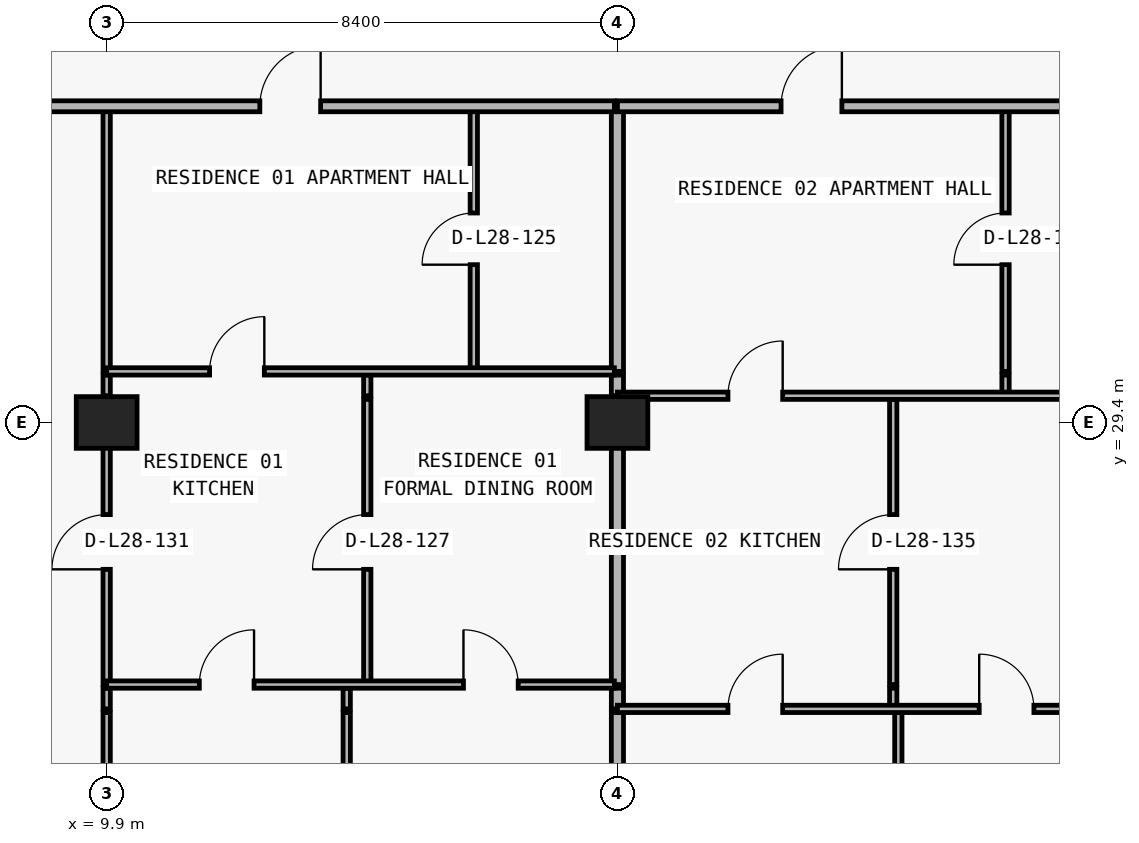
"""IFC4 building model, lengths in metres.
Left out: names, types, materials, properties, quantities, classifications, styles, units other than length and angle.
Written with IfcOpenShell. Run it as: python <this file> out.ifc"""

import sys

from ifc_helpers import new_model, si_unit, direction, frame, frame_2d, origin, origin_2d, place, context, subcontext, project, spatial, rectangle, extrude, element, fill, save


model = new_model("IFC4")
c1 = context("Model", 3, precision=1e-05, world=origin(), true_north=direction((0.0, 1.0)))
c2 = subcontext(c1, "Body", "Model", "MODEL_VIEW")
j1 = project(units=[si_unit("LENGTHUNIT", "METRE"), si_unit("PLANEANGLEUNIT", "RADIAN")], contexts=[c1])
p1 = place(None, origin())
s1 = spatial("IfcSite", under=j1, at=p1, CompositionType="ELEMENT")
p2 = place(p1, origin())
s2 = spatial("IfcBuilding", under=s1, at=p2, CompositionType="ELEMENT")
p3 = place(p2, frame((0.0, 0.0, 105.9)))
s3 = spatial("IfcBuildingStorey", under=s2, at=p3, CompositionType="ELEMENT", Elevation=105.9)
for number, where, z_axis, x_axis in (
    (1, (9.9, 29.4, 0.0), (0.0, 0.0, 1.0), (1.0, 0.0, 0.0)),
    (2, (18.3, 29.4, 0.0), (0.0, 0.0, 1.0), (1.0, 0.0, 0.0)),
):
    element("IfcColumn", number, at=place(p3, frame(where, z_axis=z_axis, x_axis=x_axis)), inside=s3, PredefinedType="COLUMN", context=c2, shape_type="SweptSolid", body=[
        extrude(rectangle(XDim=1.0, YDim=0.85, at=origin_2d()), origin(), (0.0, 0.0, 1.0), 3.05),
    ])
p4 = place(p3, frame((9.9, 8.84, 0.0), z_axis=(0.0, 0.0, 1.0), x_axis=(0.0, 1.0, 0.0)))
e3 = element("IfcWall", 3, at=p4, inside=s3, PredefinedType="PARTITIONING", context=c2, shape_type="SweptSolid", body=[
    extrude(rectangle(XDim=15.79, YDim=0.12, at=frame_2d((7.895, 0.0))), origin(), (0.0, 0.0, 1.0), 2.174),
])
p5 = place(p3, frame((9.9, 24.69, 0.0), z_axis=(0.0, 0.0, 1.0), x_axis=(0.0, 1.0, 0.0)))
e4 = element("IfcWall", 4, at=p5, inside=s3, PredefinedType="PARTITIONING", context=c2, shape_type="SweptSolid", body=[
    extrude(rectangle(XDim=0.34, YDim=0.12, at=frame_2d((0.17, 0.0))), origin(), (0.0, 0.0, 1.0), 2.174),
])
p6 = place(p3, frame((9.9, 25.09, 0.0), z_axis=(0.0, 0.0, 1.0), x_axis=(0.0, 1.0, 0.0)))
e5 = element("IfcWall", 5, at=p6, inside=s3, PredefinedType="PARTITIONING", context=c2, shape_type="SweptSolid", body=[
    extrude(rectangle(XDim=4.69, YDim=0.12, at=frame_2d((2.345, 0.0))), origin(), (0.0, 0.0, 1.0), 2.174),
])
p7 = place(p6, frame((1.895, 0.0, 0.0)))
e6 = element("IfcOpeningElement", 6, at=p7, cuts=e5, PredefinedType="OPENING", context=c2, shape_type="SweptSolid", body=[
    extrude(rectangle(XDim=0.9, YDim=2.124, at=frame_2d((0.45, 1.062))), frame((0.0, 0.07, 0.0), z_axis=(0.0, -1.0, 0.0), x_axis=(1.0, 0.0, 0.0)), (0.0, 0.0, 1.0), 0.14),
])
p8 = place(p3, frame((9.9, 29.84, 0.0), z_axis=(0.0, 0.0, 1.0), x_axis=(0.0, 1.0, 0.0)))
e7 = element("IfcWall", 7, at=p8, inside=s3, PredefinedType="PARTITIONING", context=c2, shape_type="SweptSolid", body=[
    extrude(rectangle(XDim=0.34, YDim=0.12, at=frame_2d((0.17, 0.0))), origin(), (0.0, 0.0, 1.0), 2.174),
])
p9 = place(p3, frame((9.9, 30.24, 0.0), z_axis=(0.0, 0.0, 1.0), x_axis=(0.0, 1.0, 0.0)))
e8 = element("IfcWall", 8, at=p9, inside=s3, PredefinedType="PARTITIONING", context=c2, shape_type="SweptSolid", body=[
    extrude(rectangle(XDim=4.36, YDim=0.12, at=frame_2d((2.18, 0.0))), origin(), (0.0, 0.0, 1.0), 2.174),
])
p10 = place(p3, frame((13.848, 8.84, 0.0), z_axis=(0.0, 0.0, 1.0), x_axis=(0.0, 1.0, 0.0)))
e9 = element("IfcWall", 9, at=p10, inside=s3, PredefinedType="PARTITIONING", context=c2, shape_type="SweptSolid", body=[
    extrude(rectangle(XDim=15.79, YDim=0.12, at=frame_2d((7.895, 0.0))), origin(), (0.0, 0.0, 1.0), 3.05),
])
p11 = place(p3, frame((13.848, 24.69, 0.0), z_axis=(0.0, 0.0, 1.0), x_axis=(0.0, 1.0, 0.0)))
e10 = element("IfcWall", 10, at=p11, inside=s3, PredefinedType="PARTITIONING", context=c2, shape_type="SweptSolid", body=[
    extrude(rectangle(XDim=0.34, YDim=0.12, at=frame_2d((0.17, 0.0))), origin(), (0.0, 0.0, 1.0), 3.05),
])
p12 = place(p3, frame((14.186, 25.09, 0.0), z_axis=(0.0, 0.0, 1.0), x_axis=(0.0, 1.0, 0.0)))
e11 = element("IfcWall", 11, at=p12, inside=s3, PredefinedType="PARTITIONING", context=c2, shape_type="SweptSolid", body=[
    extrude(rectangle(XDim=4.69, YDim=0.12, at=frame_2d((2.345, 0.0))), origin(), (0.0, 0.0, 1.0), 3.05),
])
p13 = place(p12, frame((1.895, 0.0, 0.0)))
e12 = element("IfcOpeningElement", 12, at=p13, cuts=e11, PredefinedType="OPENING", context=c2, shape_type="SweptSolid", body=[
    extrude(rectangle(XDim=0.9, YDim=2.15, at=frame_2d((0.45, 1.075))), frame((0.0, 0.07, 0.0), z_axis=(0.0, -1.0, 0.0), x_axis=(1.0, 0.0, 0.0)), (0.0, 0.0, 1.0), 0.14),
])
p14 = place(p3, frame((14.186, 29.84, 0.0), z_axis=(0.0, 0.0, 1.0), x_axis=(0.0, 1.0, 0.0)))
e13 = element("IfcWall", 13, at=p14, inside=s3, PredefinedType="PARTITIONING", context=c2, shape_type="SweptSolid", body=[
    extrude(rectangle(XDim=0.34, YDim=0.12, at=frame_2d((0.17, 0.0))), origin(), (0.0, 0.0, 1.0), 3.05),
])
p15 = place(p3, frame((15.938, 30.24, 0.0), z_axis=(0.0, 0.0, 1.0), x_axis=(0.0, 1.0, 0.0)))
e14 = element("IfcWall", 14, at=p15, inside=s3, PredefinedType="PARTITIONING", context=c2, shape_type="SweptSolid", body=[
    extrude(rectangle(XDim=4.36, YDim=0.12, at=frame_2d((2.18, 0.0))), origin(), (0.0, 0.0, 1.0), 3.05),
])
p16 = place(p15, frame((1.755, 0.0, 0.0)))
e15 = element("IfcOpeningElement", 15, at=p16, cuts=e14, PredefinedType="OPENING", context=c2, shape_type="SweptSolid", body=[
    extrude(rectangle(XDim=0.85, YDim=2.1, at=frame_2d((0.425, 1.05))), frame((0.0, 0.07, 0.0), z_axis=(0.0, -1.0, 0.0), x_axis=(1.0, 0.0, 0.0)), (0.0, 0.0, 1.0), 0.14),
])
p17 = place(p3, frame((18.3, 8.84, 0.0), z_axis=(0.0, 0.0, 1.0), x_axis=(0.0, 1.0, 0.0)))
e16 = element("IfcWall", 16, at=p17, inside=s3, PredefinedType="PARTITIONING", context=c2, shape_type="SweptSolid", body=[
    extrude(rectangle(XDim=15.79, YDim=0.2, at=frame_2d((7.895, 0.0))), origin(), (0.0, 0.0, 1.0), 2.174),
])
p18 = place(p3, frame((18.3, 24.69, 0.0), z_axis=(0.0, 0.0, 1.0), x_axis=(0.0, 1.0, 0.0)))
e17 = element("IfcWall", 17, at=p18, inside=s3, PredefinedType="PARTITIONING", context=c2, shape_type="SweptSolid", body=[
    extrude(rectangle(XDim=0.34, YDim=0.2, at=frame_2d((0.17, 0.0))), origin(), (0.0, 0.0, 1.0), 2.174),
])
p19 = place(p3, frame((18.3, 25.09, 0.0), z_axis=(0.0, 0.0, 1.0), x_axis=(0.0, 1.0, 0.0)))
e18 = element("IfcWall", 18, at=p19, inside=s3, PredefinedType="PARTITIONING", context=c2, shape_type="SweptSolid", body=[
    extrude(rectangle(XDim=4.69, YDim=0.2, at=frame_2d((2.345, 0.0))), origin(), (0.0, 0.0, 1.0), 2.174),
])
p20 = place(p3, frame((18.3, 29.84, 0.0), z_axis=(0.0, 0.0, 1.0), x_axis=(0.0, 1.0, 0.0)))
e19 = element("IfcWall", 19, at=p20, inside=s3, PredefinedType="PARTITIONING", context=c2, shape_type="SweptSolid", body=[
    extrude(rectangle(XDim=0.34, YDim=0.2, at=frame_2d((0.17, 0.0))), origin(), (0.0, 0.0, 1.0), 2.174),
])
p21 = place(p3, frame((18.3, 30.24, 0.0), z_axis=(0.0, 0.0, 1.0), x_axis=(0.0, 1.0, 0.0)))
e20 = element("IfcWall", 20, at=p21, inside=s3, PredefinedType="PARTITIONING", context=c2, shape_type="SweptSolid", body=[
    extrude(rectangle(XDim=4.36, YDim=0.2, at=frame_2d((2.18, 0.0))), origin(), (0.0, 0.0, 1.0), 2.174),
])
p22 = place(p3, frame((22.836, 24.69, 0.0), z_axis=(0.0, 0.0, 1.0), x_axis=(0.0, 1.0, 0.0)))
e21 = element("IfcWall", 21, at=p22, inside=s3, PredefinedType="PARTITIONING", context=c2, shape_type="SweptSolid", body=[
    extrude(rectangle(XDim=0.34, YDim=0.12, at=frame_2d((0.17, 0.0))), origin(), (0.0, 0.0, 1.0), 3.05),
])
p23 = place(p3, frame((22.836, 25.09, 0.0), z_axis=(0.0, 0.0, 1.0), x_axis=(0.0, 1.0, 0.0)))
e22 = element("IfcWall", 22, at=p23, inside=s3, PredefinedType="PARTITIONING", context=c2, shape_type="SweptSolid", body=[
    extrude(rectangle(XDim=4.69, YDim=0.12, at=frame_2d((2.345, 0.0))), origin(), (0.0, 0.0, 1.0), 3.05),
])
p24 = place(p23, frame((1.895, 0.0, 0.0)))
e23 = element("IfcOpeningElement", 23, at=p24, cuts=e22, PredefinedType="OPENING", context=c2, shape_type="SweptSolid", body=[
    extrude(rectangle(XDim=0.9, YDim=2.15, at=frame_2d((0.45, 1.075))), frame((0.0, 0.07, 0.0), z_axis=(0.0, -1.0, 0.0), x_axis=(1.0, 0.0, 0.0)), (0.0, 0.0, 1.0), 0.14),
])
p25 = place(p3, frame((22.92, 8.84, 0.0), z_axis=(0.0, 0.0, 1.0), x_axis=(0.0, 1.0, 0.0)))
e24 = element("IfcWall", 24, at=p25, inside=s3, PredefinedType="PARTITIONING", context=c2, shape_type="SweptSolid", body=[
    extrude(rectangle(XDim=15.79, YDim=0.12, at=frame_2d((7.895, 0.0))), origin(), (0.0, 0.0, 1.0), 3.05),
])
p26 = place(p3, frame((24.683, 29.84, 0.0), z_axis=(0.0, 0.0, 1.0), x_axis=(0.0, 1.0, 0.0)))
e25 = element("IfcWall", 25, at=p26, inside=s3, PredefinedType="PARTITIONING", context=c2, shape_type="SweptSolid", body=[
    extrude(rectangle(XDim=0.34, YDim=0.12, at=frame_2d((0.17, 0.0))), origin(), (0.0, 0.0, 1.0), 3.05),
])
p27 = place(p3, frame((24.683, 30.24, 0.0), z_axis=(0.0, 0.0, 1.0), x_axis=(0.0, 1.0, 0.0)))
e26 = element("IfcWall", 26, at=p27, inside=s3, PredefinedType="PARTITIONING", context=c2, shape_type="SweptSolid", body=[
    extrude(rectangle(XDim=4.36, YDim=0.12, at=frame_2d((2.18, 0.0))), origin(), (0.0, 0.0, 1.0), 3.05),
])
p28 = place(p27, frame((1.755, 0.0, 0.0)))
e27 = element("IfcOpeningElement", 27, at=p28, cuts=e26, PredefinedType="OPENING", context=c2, shape_type="SweptSolid", body=[
    extrude(rectangle(XDim=0.85, YDim=2.1, at=frame_2d((0.425, 1.05))), frame((0.0, 0.07, 0.0), z_axis=(0.0, -1.0, 0.0), x_axis=(1.0, 0.0, 0.0)), (0.0, 0.0, 1.0), 0.14),
])
p29 = place(p3, frame((18.3, 24.69, 0.0), z_axis=(0.0, 0.0, 1.0), x_axis=(1.0, 0.0, 0.0)))
e28 = element("IfcWall", 28, at=p29, inside=s3, PredefinedType="PARTITIONING", context=c2, shape_type="SweptSolid", body=[
    extrude(rectangle(XDim=8.18, YDim=0.12, at=frame_2d((4.09, 0.0))), origin(), (0.0, 0.0, 1.0), 3.05),
])
p30 = place(p29, frame((1.818, 0.0, 0.0)))
e29 = element("IfcOpeningElement", 29, at=p30, cuts=e28, PredefinedType="OPENING", context=c2, shape_type="SweptSolid", body=[
    extrude(rectangle(XDim=0.9, YDim=2.15, at=frame_2d((0.45, 1.075))), frame((0.0, 0.07, 0.0), z_axis=(0.0, -1.0, 0.0), x_axis=(1.0, 0.0, 0.0)), (0.0, 0.0, 1.0), 0.14),
])
p31 = place(p29, frame((5.95, 0.0, 0.0)))
e30 = element("IfcOpeningElement", 30, at=p31, cuts=e28, PredefinedType="OPENING", context=c2, shape_type="SweptSolid", body=[
    extrude(rectangle(XDim=0.9, YDim=2.15, at=frame_2d((0.45, 1.075))), frame((0.0, 0.07, 0.0), z_axis=(0.0, -1.0, 0.0), x_axis=(1.0, 0.0, 0.0)), (0.0, 0.0, 1.0), 0.14),
])
p32 = place(p3, frame((9.9, 25.09, 0.0), z_axis=(0.0, 0.0, 1.0), x_axis=(1.0, 0.0, 0.0)))
e31 = element("IfcWall", 31, at=p32, inside=s3, PredefinedType="PARTITIONING", context=c2, shape_type="SweptSolid", body=[
    extrude(rectangle(XDim=8.35, YDim=0.12, at=frame_2d((4.175, 0.0))), origin(), (0.0, 0.0, 1.0), 3.05),
])
p33 = place(p32, frame((1.524, 0.0, 0.0)))
e32 = element("IfcOpeningElement", 32, at=p33, cuts=e31, PredefinedType="OPENING", context=c2, shape_type="SweptSolid", body=[
    extrude(rectangle(XDim=0.9, YDim=2.15, at=frame_2d((0.45, 1.075))), frame((0.0, 0.07, 0.0), z_axis=(0.0, -1.0, 0.0), x_axis=(1.0, 0.0, 0.0)), (0.0, 0.0, 1.0), 0.14),
])
p34 = place(p32, frame((5.868, 0.0, 0.0)))
e33 = element("IfcOpeningElement", 33, at=p34, cuts=e31, PredefinedType="OPENING", context=c2, shape_type="SweptSolid", body=[
    extrude(rectangle(XDim=0.9, YDim=2.15, at=frame_2d((0.45, 1.075))), frame((0.0, 0.07, 0.0), z_axis=(0.0, -1.0, 0.0), x_axis=(1.0, 0.0, 0.0)), (0.0, 0.0, 1.0), 0.14),
])
p35 = place(p3, frame((18.3, 29.84, 0.0), z_axis=(0.0, 0.0, 1.0), x_axis=(1.0, 0.0, 0.0)))
e34 = element("IfcWall", 34, at=p35, inside=s3, PredefinedType="PARTITIONING", context=c2, shape_type="SweptSolid", body=[
    extrude(rectangle(XDim=8.35, YDim=0.12, at=frame_2d((4.175, 0.0))), origin(), (0.0, 0.0, 1.0), 3.05),
])
p36 = place(p35, frame((1.818, 0.0, 0.0)))
e35 = element("IfcOpeningElement", 35, at=p36, cuts=e34, PredefinedType="OPENING", context=c2, shape_type="SweptSolid", body=[
    extrude(rectangle(XDim=0.9, YDim=2.15, at=frame_2d((0.45, 1.075))), frame((0.0, 0.07, 0.0), z_axis=(0.0, -1.0, 0.0), x_axis=(1.0, 0.0, 0.0)), (0.0, 0.0, 1.0), 0.14),
])
p37 = place(p3, frame((9.9, 30.24, 0.0), z_axis=(0.0, 0.0, 1.0), x_axis=(1.0, 0.0, 0.0)))
e36 = element("IfcWall", 36, at=p37, inside=s3, PredefinedType="PARTITIONING", context=c2, shape_type="SweptSolid", body=[
    extrude(rectangle(XDim=8.35, YDim=0.12, at=frame_2d((4.175, 0.0))), origin(), (0.0, 0.0, 1.0), 3.05),
])
p38 = place(p37, frame((1.693, 0.0, 0.0)))
e37 = element("IfcOpeningElement", 37, at=p38, cuts=e36, PredefinedType="OPENING", context=c2, shape_type="SweptSolid", body=[
    extrude(rectangle(XDim=0.9, YDim=2.15, at=frame_2d((0.45, 1.075))), frame((0.0, 0.07, 0.0), z_axis=(0.0, -1.0, 0.0), x_axis=(1.0, 0.0, 0.0)), (0.0, 0.0, 1.0), 0.14),
])
p39 = place(p3, frame((7.705, 34.6, 0.0), z_axis=(0.0, 0.0, 1.0), x_axis=(1.0, 0.0, 0.0)))
e38 = element("IfcWall", 38, at=p39, inside=s3, PredefinedType="PARTITIONING", context=c2, shape_type="SweptSolid", body=[
    extrude(rectangle(XDim=10.545, YDim=0.18, at=frame_2d((5.272, 0.0))), origin(), (0.0, 0.0, 1.0), 3.05),
])
p40 = place(p39, frame((4.714, 0.0, 0.0)))
e39 = element("IfcOpeningElement", 39, at=p40, cuts=e38, PredefinedType="OPENING", context=c2, shape_type="SweptSolid", body=[
    extrude(rectangle(XDim=1.0, YDim=2.2, at=frame_2d((0.5, 1.1))), frame((0.0, 0.1, 0.0), z_axis=(0.0, -1.0, 0.0), x_axis=(1.0, 0.0, 0.0)), (0.0, 0.0, 1.0), 0.2),
])
p41 = place(p3, frame((18.3, 34.6, 0.0), z_axis=(0.0, 0.0, 1.0), x_axis=(1.0, 0.0, 0.0)))
e40 = element("IfcWall", 40, at=p41, inside=s3, PredefinedType="PARTITIONING", context=c2, shape_type="SweptSolid", body=[
    extrude(rectangle(XDim=8.35, YDim=0.18, at=frame_2d((4.175, 0.0))), origin(), (0.0, 0.0, 1.0), 3.05),
])
p42 = place(p41, frame((2.691, 0.0, 0.0)))
e41 = element("IfcOpeningElement", 41, at=p42, cuts=e40, PredefinedType="OPENING", context=c2, shape_type="SweptSolid", body=[
    extrude(rectangle(XDim=1.0, YDim=2.2, at=frame_2d((0.5, 1.1))), frame((0.0, 0.1, 0.0), z_axis=(0.0, -1.0, 0.0), x_axis=(1.0, 0.0, 0.0)), (0.0, 0.0, 1.0), 0.2),
])
p43 = place(p40, origin())
e42 = element("IfcDoor", 42, at=p43, inside=s3, OperationType="SINGLE_SWING_RIGHT", PredefinedType="DOOR", context=c2, shape_type="SweptSolid", body=[
    extrude(rectangle(XDim=1.0, YDim=2.2, at=frame_2d((0.5, 1.1))), frame((0.0, 0.025, 0.0), z_axis=(0.0, -1.0, 0.0), x_axis=(1.0, 0.0, 0.0)), (0.0, 0.0, 1.0), 0.05),
])
fill(e39, e42)
p44 = place(p16, origin())
e43 = element("IfcDoor", 43, at=p44, inside=s3, OperationType="SINGLE_SWING_LEFT", PredefinedType="DOOR", context=c2, shape_type="SweptSolid", body=[
    extrude(rectangle(XDim=0.85, YDim=2.1, at=frame_2d((0.425, 1.05))), frame((0.0, 0.025, 0.0), z_axis=(0.0, -1.0, 0.0), x_axis=(1.0, 0.0, 0.0)), (0.0, 0.0, 1.0), 0.05),
])
fill(e15, e43)
p45 = place(p38, origin())
e44 = element("IfcDoor", 44, at=p45, inside=s3, OperationType="SINGLE_SWING_RIGHT", PredefinedType="DOOR", context=c2, shape_type="SweptSolid", body=[
    extrude(rectangle(XDim=0.9, YDim=2.15, at=frame_2d((0.45, 1.075))), frame((0.0, 0.025, 0.0), z_axis=(0.0, -1.0, 0.0), x_axis=(1.0, 0.0, 0.0)), (0.0, 0.0, 1.0), 0.05),
])
fill(e37, e44)
p46 = place(p13, origin())
e45 = element("IfcDoor", 45, at=p46, inside=s3, OperationType="SINGLE_SWING_LEFT", PredefinedType="DOOR", context=c2, shape_type="SweptSolid", body=[
    extrude(rectangle(XDim=0.9, YDim=2.15, at=frame_2d((0.45, 1.075))), frame((0.0, 0.025, 0.0), z_axis=(0.0, -1.0, 0.0), x_axis=(1.0, 0.0, 0.0)), (0.0, 0.0, 1.0), 0.05),
])
fill(e12, e45)
p47 = place(p33, origin())
e46 = element("IfcDoor", 46, at=p47, inside=s3, OperationType="SINGLE_SWING_RIGHT", PredefinedType="DOOR", context=c2, shape_type="SweptSolid", body=[
    extrude(rectangle(XDim=0.9, YDim=2.15, at=frame_2d((0.45, 1.075))), frame((0.0, 0.025, 0.0), z_axis=(0.0, -1.0, 0.0), x_axis=(1.0, 0.0, 0.0)), (0.0, 0.0, 1.0), 0.05),
])
fill(e32, e46)
p48 = place(p34, origin())
e47 = element("IfcDoor", 47, at=p48, inside=s3, OperationType="SINGLE_SWING_LEFT", PredefinedType="DOOR", context=c2, shape_type="SweptSolid", body=[
    extrude(rectangle(XDim=0.9, YDim=2.15, at=frame_2d((0.45, 1.075))), frame((0.0, 0.025, 0.0), z_axis=(0.0, -1.0, 0.0), x_axis=(1.0, 0.0, 0.0)), (0.0, 0.0, 1.0), 0.05),
])
fill(e33, e47)
p49 = place(p7, origin())
e48 = element("IfcDoor", 48, at=p49, inside=s3, OperationType="SINGLE_SWING_LEFT", PredefinedType="DOOR", context=c2, shape_type="SweptSolid", body=[
    extrude(rectangle(XDim=0.9, YDim=2.124, at=frame_2d((0.45, 1.062))), frame((0.0, 0.025, 0.0), z_axis=(0.0, -1.0, 0.0), x_axis=(1.0, 0.0, 0.0)), (0.0, 0.0, 1.0), 0.05),
])
fill(e6, e48)
p50 = place(p42, origin())
e49 = element("IfcDoor", 49, at=p50, inside=s3, OperationType="SINGLE_SWING_RIGHT", PredefinedType="DOOR", context=c2, shape_type="SweptSolid", body=[
    extrude(rectangle(XDim=1.0, YDim=2.2, at=frame_2d((0.5, 1.1))), frame((0.0, 0.025, 0.0), z_axis=(0.0, -1.0, 0.0), x_axis=(1.0, 0.0, 0.0)), (0.0, 0.0, 1.0), 0.05),
])
fill(e41, e49)
p51 = place(p28, origin())
e50 = element("IfcDoor", 50, at=p51, inside=s3, OperationType="SINGLE_SWING_LEFT", PredefinedType="DOOR", context=c2, shape_type="SweptSolid", body=[
    extrude(rectangle(XDim=0.85, YDim=2.1, at=frame_2d((0.425, 1.05))), frame((0.0, 0.025, 0.0), z_axis=(0.0, -1.0, 0.0), x_axis=(1.0, 0.0, 0.0)), (0.0, 0.0, 1.0), 0.05),
])
fill(e27, e50)
p52 = place(p36, origin())
e51 = element("IfcDoor", 51, at=p52, inside=s3, OperationType="SINGLE_SWING_RIGHT", PredefinedType="DOOR", context=c2, shape_type="SweptSolid", body=[
    extrude(rectangle(XDim=0.9, YDim=2.15, at=frame_2d((0.45, 1.075))), frame((0.0, 0.025, 0.0), z_axis=(0.0, -1.0, 0.0), x_axis=(1.0, 0.0, 0.0)), (0.0, 0.0, 1.0), 0.05),
])
fill(e35, e51)
p53 = place(p24, origin())
e52 = element("IfcDoor", 52, at=p53, inside=s3, OperationType="SINGLE_SWING_LEFT", PredefinedType="DOOR", context=c2, shape_type="SweptSolid", body=[
    extrude(rectangle(XDim=0.9, YDim=2.15, at=frame_2d((0.45, 1.075))), frame((0.0, 0.025, 0.0), z_axis=(0.0, -1.0, 0.0), x_axis=(1.0, 0.0, 0.0)), (0.0, 0.0, 1.0), 0.05),
])
fill(e23, e52)
p54 = place(p30, origin())
e53 = element("IfcDoor", 53, at=p54, inside=s3, OperationType="SINGLE_SWING_RIGHT", PredefinedType="DOOR", context=c2, shape_type="SweptSolid", body=[
    extrude(rectangle(XDim=0.9, YDim=2.15, at=frame_2d((0.45, 1.075))), frame((0.0, 0.025, 0.0), z_axis=(0.0, -1.0, 0.0), x_axis=(1.0, 0.0, 0.0)), (0.0, 0.0, 1.0), 0.05),
])
fill(e29, e53)
p55 = place(p31, origin())
e54 = element("IfcDoor", 54, at=p55, inside=s3, OperationType="SINGLE_SWING_LEFT", PredefinedType="DOOR", context=c2, shape_type="SweptSolid", body=[
    extrude(rectangle(XDim=0.9, YDim=2.15, at=frame_2d((0.45, 1.075))), frame((0.0, 0.025, 0.0), z_axis=(0.0, -1.0, 0.0), x_axis=(1.0, 0.0, 0.0)), (0.0, 0.0, 1.0), 0.05),
])
fill(e30, e54)
save(model, sys.argv[1])
